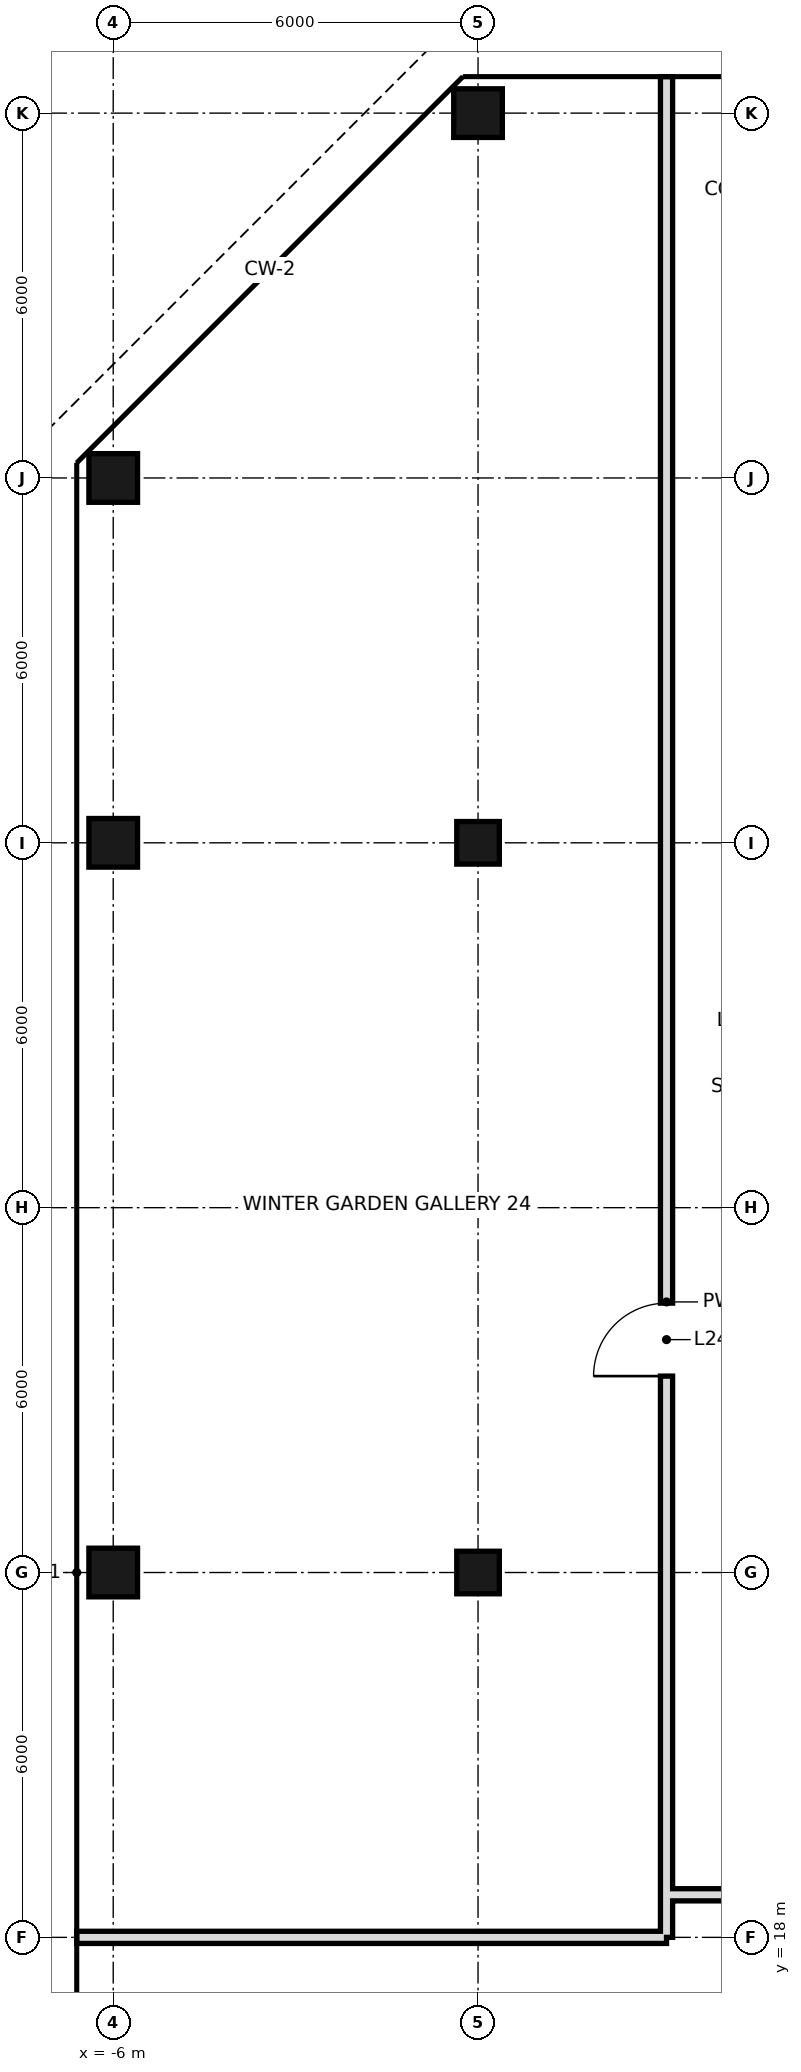
"""IFC4 building model, lengths in metres.
Left out: names, types, materials, properties, quantities, classifications, styles, units other than length and angle.
Written with IfcOpenShell. Run it as: python <this file> out.ifc"""

import sys

from ifc_helpers import new_model, si_unit, direction, frame, frame_2d, origin, origin_2d, place, context, subcontext, project, spatial, rectangle, hollow_rectangle, extrude, element, fill, save


model = new_model("IFC4")
c1 = context("Model", 3, precision=1e-05, world=origin(), true_north=direction((0.0, 1.0)))
c2 = subcontext(c1, "Body", "Model", "MODEL_VIEW")
j1 = project(units=[si_unit("LENGTHUNIT", "METRE"), si_unit("PLANEANGLEUNIT", "RADIAN")], contexts=[c1])
p1 = place(None, origin())
s1 = spatial("IfcSite", under=j1, at=p1, CompositionType="ELEMENT")
p2 = place(p1, origin())
s2 = spatial("IfcBuilding", under=s1, at=p2, CompositionType="ELEMENT")
p3 = place(p2, frame((0.0, 0.0, 110.6)))
s3 = spatial("IfcBuildingStorey", under=s2, at=p3, CompositionType="ELEMENT", Elevation=110.6)
for number, where, z_axis, x_axis in (
    (1, (-6.0, 24.0, 0.0), (0.0, 0.0, 1.0), (1.0, 0.0, 0.0)),
    (2, (-6.0, 36.0, 0.0), (0.0, 0.0, 1.0), (1.0, 0.0, 0.0)),
    (3, (-6.0, 42.0, 0.0), (0.0, 0.0, 1.0), (1.0, 0.0, 0.0)),
):
    element("IfcColumn", number, at=place(p3, frame(where, z_axis=z_axis, x_axis=x_axis)), inside=s3, PredefinedType="COLUMN", context=c2, shape_type="SweptSolid", body=[
        extrude(hollow_rectangle(XDim=0.8, YDim=0.8, WallThickness=0.04, at=origin_2d()), origin(), (0.0, 0.0, 1.0), 3.6),
    ])
for number, where, z_axis, x_axis in (
    (4, (0.0, 24.0, 0.0), (0.0, 0.0, 1.0), (1.0, 0.0, 0.0)),
    (5, (0.0, 36.0, 0.0), (0.0, 0.0, 1.0), (1.0, 0.0, 0.0)),
):
    element("IfcColumn", number, at=place(p3, frame(where, z_axis=z_axis, x_axis=x_axis)), inside=s3, PredefinedType="COLUMN", context=c2, shape_type="SweptSolid", body=[
        extrude(hollow_rectangle(XDim=0.7, YDim=0.7, WallThickness=0.036, at=origin_2d()), origin(), (0.0, 0.0, 1.0), 3.6),
    ])
p4 = place(p3, frame((0.0, 48.0, 0.0), z_axis=(0.0, 0.0, 1.0), x_axis=(1.0, 0.0, 0.0)))
e6 = element("IfcColumn", 6, at=p4, inside=s3, PredefinedType="COLUMN", context=c2, shape_type="SweptSolid", body=[
    extrude(hollow_rectangle(XDim=0.8, YDim=0.8, WallThickness=0.04, at=origin_2d()), origin(), (0.0, 0.0, 1.0), 3.6),
])
p5 = place(p3, frame((3.1, 18.0, 0.0), z_axis=(0.0, 0.0, 1.0), x_axis=(0.0, 1.0, 0.0)))
e7 = element("IfcWall", 7, at=p5, inside=s3, PredefinedType="SOLIDWALL", context=c2, shape_type="SweptSolid", body=[
    extrude(rectangle(XDim=30.6, YDim=0.2, at=frame_2d((15.3, 0.0))), origin(), (0.0, 0.0, 1.0), 2.68),
])
p6 = place(p5, frame((9.23, 0.0, 0.0)))
e8 = element("IfcOpeningElement", 8, at=p6, cuts=e7, PredefinedType="OPENING", context=c2, shape_type="SweptSolid", body=[
    extrude(rectangle(XDim=1.2, YDim=2.4, at=frame_2d((0.6, 1.2))), frame((0.0, 0.11, 0.0), z_axis=(0.0, -1.0, 0.0), x_axis=(1.0, 0.0, 0.0)), (0.0, 0.0, 1.0), 0.22),
])
p7 = place(p3, frame((-6.6, 18.0, 0.0), z_axis=(0.0, 0.0, 1.0), x_axis=(1.0, 0.0, 0.0)))
e9 = element("IfcWall", 9, at=p7, inside=s3, PredefinedType="SOLIDWALL", context=c2, shape_type="SweptSolid", body=[
    extrude(rectangle(XDim=9.7, YDim=0.2, at=frame_2d((4.85, 0.0))), origin(), (0.0, 0.0, 1.0), 2.68),
])
p8 = place(p3, frame((3.1, 18.7, 0.0), z_axis=(0.0, 0.0, 1.0), x_axis=(1.0, 0.0, 0.0)))
e10 = element("IfcWall", 10, at=p8, inside=s3, PredefinedType="SOLIDWALL", context=c2, shape_type="SweptSolid", body=[
    extrude(rectangle(XDim=13.1, YDim=0.2, at=frame_2d((6.55, 0.0))), origin(), (0.0, 0.0, 1.0), 2.68),
])
p9 = place(p6, origin())
e11 = element("IfcDoor", 11, at=p9, inside=s3, OperationType="SINGLE_SWING_LEFT", PredefinedType="DOOR", context=c2, shape_type="SweptSolid", body=[
    extrude(rectangle(XDim=1.2, YDim=2.4, at=frame_2d((0.6, 1.2))), frame((0.0, 0.025, 0.0), z_axis=(0.0, -1.0, 0.0), x_axis=(1.0, 0.0, 0.0)), (0.0, 0.0, 1.0), 0.05),
])
fill(e8, e11)
save(model, sys.argv[1])
